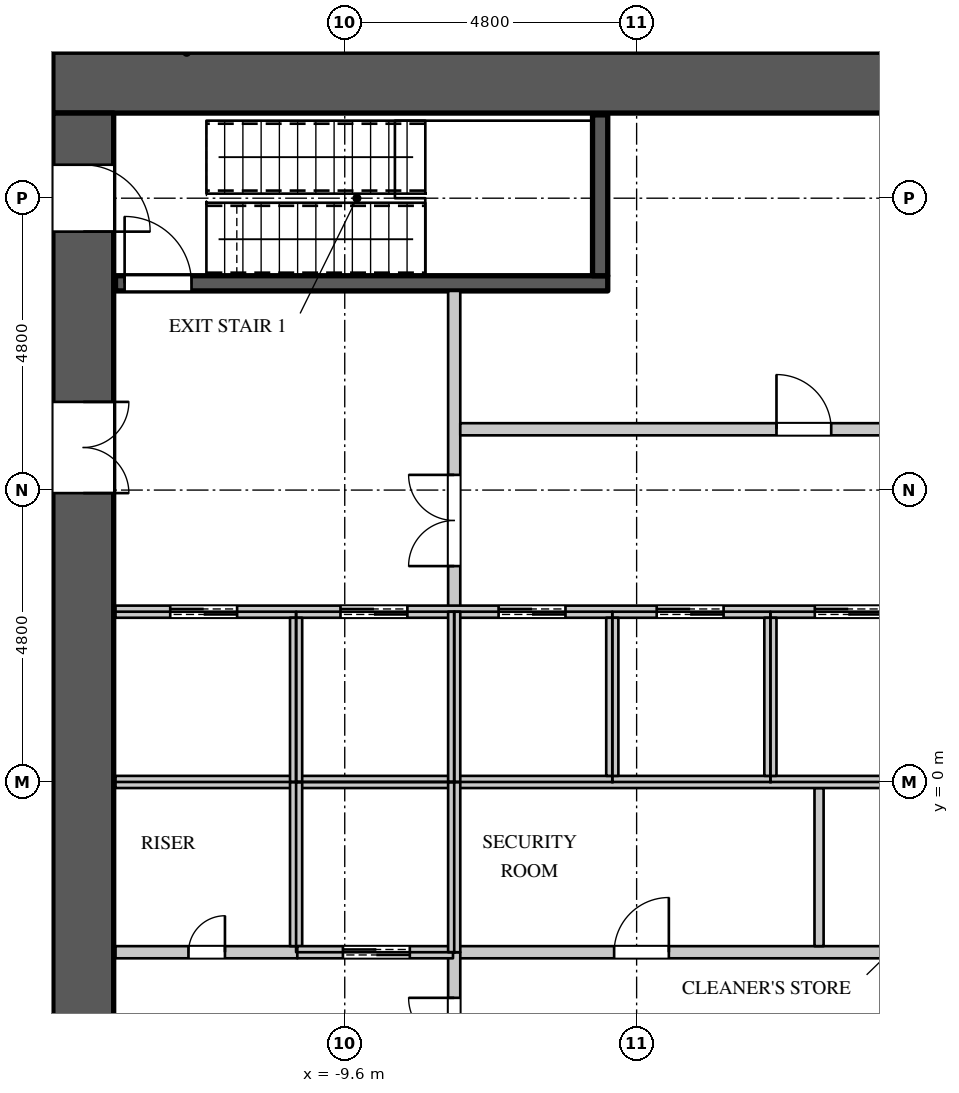
"""IFC4 building model, lengths in metres.
Left out: names, types, materials, properties, quantities, classifications, styles, units other than length and angle.
Written with IfcOpenShell. Run it as: python <this file> out.ifc"""

import sys

from ifc_helpers import new_model, si_unit, direction, frame, frame_2d, origin, place, context, subcontext, project, spatial, rectangle, extrude, element, fill, save


model = new_model("IFC4")
c1 = context("Model", 3, precision=1e-05, world=origin(), true_north=direction((0.0, 1.0)))
c2 = subcontext(c1, "Body", "Model", "MODEL_VIEW")
j1 = project(units=[si_unit("LENGTHUNIT", "METRE"), si_unit("PLANEANGLEUNIT", "RADIAN")], contexts=[c1])
p1 = place(None, origin())
s1 = spatial("IfcSite", under=j1, at=p1, CompositionType="ELEMENT")
p2 = place(p1, origin())
s2 = spatial("IfcBuilding", under=s1, at=p2, CompositionType="ELEMENT")
p3 = place(p2, frame((0.0, 0.0, 50.7)))
s3 = spatial("IfcBuildingStorey", under=s2, at=p3, CompositionType="ELEMENT", Elevation=50.7)
p4 = place(p3, frame((-14.4, 11.5, 0.0), z_axis=(0.0, 0.0, 1.0), x_axis=(1.0, 0.0, 0.0)))
e1 = element("IfcWall", 1, at=p4, inside=s3, PredefinedType="SHEAR", context=c2, shape_type="SweptSolid", body=[
    extrude(rectangle(XDim=28.8, YDim=1.0, at=frame_2d((14.4, 0.0))), origin(), (0.0, 0.0, 1.0), 4.2),
])
p5 = place(p3, frame((-13.9, -11.0, 0.0), z_axis=(0.0, 0.0, 1.0), x_axis=(0.0, 1.0, 0.0)))
e2 = element("IfcWall", 2, at=p5, inside=s3, PredefinedType="SHEAR", context=c2, shape_type="SweptSolid", body=[
    extrude(rectangle(XDim=22.0, YDim=1.0, at=frame_2d((11.0, 0.0))), origin(), (0.0, 0.0, 1.0), 4.2),
])
p6 = place(p5, frame((20.05, 0.0, 0.0)))
e3 = element("IfcOpeningElement", 3, at=p6, cuts=e2, PredefinedType="OPENING", context=c2, shape_type="SweptSolid", body=[
    extrude(rectangle(XDim=1.1, YDim=2.2, at=frame_2d((0.55, 1.1))), frame((0.0, 0.51, 0.0), z_axis=(0.0, -1.0, 0.0), x_axis=(1.0, 0.0, 0.0)), (0.0, 0.0, 1.0), 1.02),
])
p7 = place(p5, frame((0.85, 0.0, 0.0)))
e4 = element("IfcOpeningElement", 4, at=p7, cuts=e2, PredefinedType="OPENING", context=c2, shape_type="SweptSolid", body=[
    extrude(rectangle(XDim=1.1, YDim=2.2, at=frame_2d((0.55, 1.1))), frame((0.0, 0.51, 0.0), z_axis=(0.0, -1.0, 0.0), x_axis=(1.0, 0.0, 0.0)), (0.0, 0.0, 1.0), 1.02),
])
p8 = place(p5, frame((15.75, 0.0, 0.0)))
e5 = element("IfcOpeningElement", 5, at=p8, cuts=e2, PredefinedType="OPENING", context=c2, shape_type="SweptSolid", body=[
    extrude(rectangle(XDim=1.5, YDim=2.4, at=frame_2d((0.75, 1.2))), frame((0.0, 0.51, 0.0), z_axis=(0.0, -1.0, 0.0), x_axis=(1.0, 0.0, 0.0)), (0.0, 0.0, 1.0), 1.02),
])
p9 = place(p5, frame((4.75, 0.0, 0.0)))
e6 = element("IfcOpeningElement", 6, at=p9, cuts=e2, PredefinedType="OPENING", context=c2, shape_type="SweptSolid", body=[
    extrude(rectangle(XDim=1.5, YDim=2.4, at=frame_2d((0.75, 1.2))), frame((0.0, 0.51, 0.0), z_axis=(0.0, -1.0, 0.0), x_axis=(1.0, 0.0, 0.0)), (0.0, 0.0, 1.0), 1.02),
])
p10 = place(p3, frame((-7.82, -2.8, 0.0), z_axis=(0.0, 0.0, 1.0), x_axis=(1.0, 0.0, 0.0)))
e7 = element("IfcWall", 7, at=p10, inside=s3, PredefinedType="PARTITIONING", context=c2, shape_type="SweptSolid", body=[
    extrude(rectangle(XDim=15.64, YDim=0.2, at=frame_2d((7.82, 0.0))), origin(), (0.0, 0.0, 1.0), 3.95),
])
p11 = place(p10, frame((2.65, 0.0, 0.0)))
e8 = element("IfcOpeningElement", 8, at=p11, cuts=e7, PredefinedType="OPENING", context=c2, shape_type="SweptSolid", body=[
    extrude(rectangle(XDim=0.9, YDim=2.2, at=frame_2d((0.45, 1.1))), frame((0.0, 0.11, 0.0), z_axis=(0.0, -1.0, 0.0), x_axis=(1.0, 0.0, 0.0)), (0.0, 0.0, 1.0), 0.22),
])
p12 = place(p10, frame((8.15, 0.0, 0.0)))
e9 = element("IfcOpeningElement", 9, at=p12, cuts=e7, PredefinedType="OPENING", context=c2, shape_type="SweptSolid", body=[
    extrude(rectangle(XDim=0.9, YDim=2.2, at=frame_2d((0.45, 1.1))), frame((0.0, 0.11, 0.0), z_axis=(0.0, -1.0, 0.0), x_axis=(1.0, 0.0, 0.0)), (0.0, 0.0, 1.0), 0.22),
])
p13 = place(p10, frame((12.9, 0.0, 0.0)))
e10 = element("IfcOpeningElement", 10, at=p13, cuts=e7, PredefinedType="OPENING", context=c2, shape_type="SweptSolid", body=[
    extrude(rectangle(XDim=0.9, YDim=2.2, at=frame_2d((0.45, 1.1))), frame((0.0, 0.11, 0.0), z_axis=(0.0, -1.0, 0.0), x_axis=(1.0, 0.0, 0.0)), (0.0, 0.0, 1.0), 0.22),
])
p14 = place(p3, frame((-7.8, -5.8, 0.0), z_axis=(0.0, 0.0, 1.0), x_axis=(0.0, 1.0, 0.0)))
e11 = element("IfcWall", 11, at=p14, inside=s3, PredefinedType="PARTITIONING", context=c2, shape_type="SweptSolid", body=[
    extrude(rectangle(XDim=3.0, YDim=0.2, at=frame_2d((1.5, 0.0))), origin(), (0.0, 0.0, 1.0), 3.95),
])
p15 = place(p14, frame((0.75, 0.0, 0.0)))
e12 = element("IfcOpeningElement", 12, at=p15, cuts=e11, PredefinedType="OPENING", context=c2, shape_type="SweptSolid", body=[
    extrude(rectangle(XDim=1.5, YDim=2.4, at=frame_2d((0.75, 1.2))), frame((0.0, 0.11, 0.0), z_axis=(0.0, -1.0, 0.0), x_axis=(1.0, 0.0, 0.0)), (0.0, 0.0, 1.0), 0.22),
])
p16 = place(p3, frame((-7.8, 2.8, 0.0), z_axis=(0.0, 0.0, 1.0), x_axis=(0.0, 1.0, 0.0)))
e13 = element("IfcWall", 13, at=p16, inside=s3, PredefinedType="PARTITIONING", context=c2, shape_type="SweptSolid", body=[
    extrude(rectangle(XDim=5.275, YDim=0.2, at=frame_2d((2.637, 0.0))), origin(), (0.0, 0.0, 1.0), 3.95),
])
p17 = place(p16, frame((0.75, 0.0, 0.0)))
e14 = element("IfcOpeningElement", 14, at=p17, cuts=e13, PredefinedType="OPENING", context=c2, shape_type="SweptSolid", body=[
    extrude(rectangle(XDim=1.5, YDim=2.4, at=frame_2d((0.75, 1.2))), frame((0.0, 0.11, 0.0), z_axis=(0.0, -1.0, 0.0), x_axis=(1.0, 0.0, 0.0)), (0.0, 0.0, 1.0), 0.22),
])
p18 = place(p3, frame((-7.7, 5.8, 0.0), z_axis=(0.0, 0.0, 1.0), x_axis=(1.0, 0.0, 0.0)))
e15 = element("IfcWall", 15, at=p18, inside=s3, PredefinedType="PARTITIONING", context=c2, shape_type="SweptSolid", body=[
    extrude(rectangle(XDim=11.32, YDim=0.2, at=frame_2d((5.66, 0.0))), origin(), (0.0, 0.0, 1.0), 3.95),
])
p19 = place(p18, frame((5.2, 0.0, 0.0)))
e16 = element("IfcOpeningElement", 16, at=p19, cuts=e15, PredefinedType="OPENING", context=c2, shape_type="SweptSolid", body=[
    extrude(rectangle(XDim=0.9, YDim=2.2, at=frame_2d((0.45, 1.1))), frame((0.0, 0.11, 0.0), z_axis=(0.0, -1.0, 0.0), x_axis=(1.0, 0.0, 0.0)), (0.0, 0.0, 1.0), 0.22),
])
p20 = place(p3, frame((-1.8, -2.7, 0.0), z_axis=(0.0, 0.0, 1.0), x_axis=(0.0, 1.0, 0.0)))
e17 = element("IfcWall", 17, at=p20, inside=s3, PredefinedType="PARTITIONING", context=c2, shape_type="SweptSolid", body=[
    extrude(rectangle(XDim=2.6, YDim=0.15, at=frame_2d((1.3, 0.0))), origin(), (0.0, 0.0, 1.0), 3.95),
])
p21 = place(p3, frame((-13.37, -2.8, 0.0), z_axis=(0.0, 0.0, 1.0), x_axis=(1.0, 0.0, 0.0)))
e18 = element("IfcWall", 18, at=p21, inside=s3, PredefinedType="PARTITIONING", context=c2, shape_type="SweptSolid", body=[
    extrude(rectangle(XDim=2.99, YDim=0.2, at=frame_2d((1.495, 0.0))), origin(), (0.0, 0.0, 1.0), 3.95),
])
p22 = place(p21, frame((1.2, 0.0, 0.0)))
e19 = element("IfcOpeningElement", 19, at=p22, cuts=e18, PredefinedType="OPENING", context=c2, shape_type="SweptSolid", body=[
    extrude(rectangle(XDim=0.6, YDim=2.0, at=frame_2d((0.3, 1.0))), frame((0.0, 0.11, 0.0), z_axis=(0.0, -1.0, 0.0), x_axis=(1.0, 0.0, 0.0)), (0.0, 0.0, 1.0), 0.22),
])
p23 = place(p3, frame((-13.37, 0.0, 0.0), z_axis=(0.0, 0.0, 1.0), x_axis=(1.0, 0.0, 0.0)))
e20 = element("IfcWall", 20, at=p23, inside=s3, PredefinedType="PARTITIONING", context=c2, shape_type="SweptSolid", body=[
    extrude(rectangle(XDim=23.77, YDim=0.2, at=frame_2d((11.885, 0.0))), origin(), (0.0, 0.0, 1.0), 3.95),
])
p24 = place(p3, frame((-13.37, 2.8, 0.0), z_axis=(0.0, 0.0, 1.0), x_axis=(1.0, 0.0, 0.0)))
e21 = element("IfcWall", 21, at=p24, inside=s3, PredefinedType="PARTITIONING", context=c2, shape_type="SweptSolid", body=[
    extrude(rectangle(XDim=23.77, YDim=0.2, at=frame_2d((11.885, 0.0))), origin(), (0.0, 0.0, 1.0), 3.95),
])
p25 = place(p24, frame((0.9, 0.0, 0.0)))
e22 = element("IfcOpeningElement", 22, at=p25, cuts=e21, PredefinedType="OPENING", context=c2, shape_type="SweptSolid", body=[
    extrude(rectangle(XDim=1.1, YDim=2.2, at=frame_2d((0.55, 1.1))), frame((0.0, 0.11, 0.0), z_axis=(0.0, -1.0, 0.0), x_axis=(1.0, 0.0, 0.0)), (0.0, 0.0, 1.0), 0.22),
])
p26 = place(p24, frame((3.7, 0.0, 0.0)))
e23 = element("IfcOpeningElement", 23, at=p26, cuts=e21, PredefinedType="OPENING", context=c2, shape_type="SweptSolid", body=[
    extrude(rectangle(XDim=1.1, YDim=2.2, at=frame_2d((0.55, 1.1))), frame((0.0, 0.11, 0.0), z_axis=(0.0, -1.0, 0.0), x_axis=(1.0, 0.0, 0.0)), (0.0, 0.0, 1.0), 0.22),
])
p27 = place(p24, frame((6.3, 0.0, 0.0)))
e24 = element("IfcOpeningElement", 24, at=p27, cuts=e21, PredefinedType="OPENING", context=c2, shape_type="SweptSolid", body=[
    extrude(rectangle(XDim=1.1, YDim=2.2, at=frame_2d((0.55, 1.1))), frame((0.0, 0.11, 0.0), z_axis=(0.0, -1.0, 0.0), x_axis=(1.0, 0.0, 0.0)), (0.0, 0.0, 1.0), 0.22),
])
p28 = place(p24, frame((8.9, 0.0, 0.0)))
e25 = element("IfcOpeningElement", 25, at=p28, cuts=e21, PredefinedType="OPENING", context=c2, shape_type="SweptSolid", body=[
    extrude(rectangle(XDim=1.1, YDim=2.2, at=frame_2d((0.55, 1.1))), frame((0.0, 0.11, 0.0), z_axis=(0.0, -1.0, 0.0), x_axis=(1.0, 0.0, 0.0)), (0.0, 0.0, 1.0), 0.22),
])
p29 = place(p24, frame((11.5, 0.0, 0.0)))
e26 = element("IfcOpeningElement", 26, at=p29, cuts=e21, PredefinedType="OPENING", context=c2, shape_type="SweptSolid", body=[
    extrude(rectangle(XDim=1.1, YDim=2.2, at=frame_2d((0.55, 1.1))), frame((0.0, 0.11, 0.0), z_axis=(0.0, -1.0, 0.0), x_axis=(1.0, 0.0, 0.0)), (0.0, 0.0, 1.0), 0.22),
])
p30 = place(p24, frame((14.1, 0.0, 0.0)))
e27 = element("IfcOpeningElement", 27, at=p30, cuts=e21, PredefinedType="OPENING", context=c2, shape_type="SweptSolid", body=[
    extrude(rectangle(XDim=1.1, YDim=2.2, at=frame_2d((0.55, 1.1))), frame((0.0, 0.11, 0.0), z_axis=(0.0, -1.0, 0.0), x_axis=(1.0, 0.0, 0.0)), (0.0, 0.0, 1.0), 0.22),
])
p31 = place(p24, frame((16.7, 0.0, 0.0)))
e28 = element("IfcOpeningElement", 28, at=p31, cuts=e21, PredefinedType="OPENING", context=c2, shape_type="SweptSolid", body=[
    extrude(rectangle(XDim=1.1, YDim=2.2, at=frame_2d((0.55, 1.1))), frame((0.0, 0.11, 0.0), z_axis=(0.0, -1.0, 0.0), x_axis=(1.0, 0.0, 0.0)), (0.0, 0.0, 1.0), 0.22),
])
p32 = place(p24, frame((19.3, 0.0, 0.0)))
e29 = element("IfcOpeningElement", 29, at=p32, cuts=e21, PredefinedType="OPENING", context=c2, shape_type="SweptSolid", body=[
    extrude(rectangle(XDim=1.1, YDim=2.2, at=frame_2d((0.55, 1.1))), frame((0.0, 0.11, 0.0), z_axis=(0.0, -1.0, 0.0), x_axis=(1.0, 0.0, 0.0)), (0.0, 0.0, 1.0), 0.22),
])
p33 = place(p3, frame((-10.4, -2.7, 0.0), z_axis=(0.0, 0.0, 1.0), x_axis=(0.0, 1.0, 0.0)))
e30 = element("IfcWall", 30, at=p33, inside=s3, PredefinedType="PARTITIONING", context=c2, shape_type="SweptSolid", body=[
    extrude(rectangle(XDim=2.7, YDim=0.2, at=frame_2d((1.35, 0.0))), origin(), (0.0, 0.0, 1.0), 3.95),
])
p34 = place(p3, frame((-10.38, -2.8, 0.0), z_axis=(0.0, 0.0, 1.0), x_axis=(1.0, 0.0, 0.0)))
e31 = element("IfcWall", 31, at=p34, inside=s3, PredefinedType="PARTITIONING", context=c2, shape_type="SweptSolid", body=[
    extrude(rectangle(XDim=2.56, YDim=0.2, at=frame_2d((1.28, 0.0))), origin(), (0.0, 0.0, 1.0), 3.95),
])
p35 = place(p34, frame((0.75, 0.0, 0.0)))
e32 = element("IfcOpeningElement", 32, at=p35, cuts=e31, PredefinedType="OPENING", context=c2, shape_type="SweptSolid", body=[
    extrude(rectangle(XDim=1.1, YDim=2.2, at=frame_2d((0.55, 1.1))), frame((0.0, 0.11, 0.0), z_axis=(0.0, -1.0, 0.0), x_axis=(1.0, 0.0, 0.0)), (0.0, 0.0, 1.0), 0.22),
])
p36 = place(p3, frame((-10.4, 0.0, 0.0), z_axis=(0.0, 0.0, 1.0), x_axis=(0.0, 1.0, 0.0)))
e33 = element("IfcWall", 33, at=p36, inside=s3, PredefinedType="PARTITIONING", context=c2, shape_type="SweptSolid", body=[
    extrude(rectangle(XDim=2.7, YDim=0.2, at=frame_2d((1.35, 0.0))), origin(), (0.0, 0.0, 1.0), 3.95),
])
for number, where, z_axis, x_axis in (
    (34, (-7.8, -2.8, 0.0), (0.0, 0.0, 1.0), (0.0, 1.0, 0.0)),
    (35, (-7.8, 0.0, 0.0), (0.0, 0.0, 1.0), (0.0, 1.0, 0.0)),
):
    element("IfcWall", number, at=place(p3, frame(where, z_axis=z_axis, x_axis=x_axis)), inside=s3, PredefinedType="PARTITIONING", context=c2, shape_type="SweptSolid", body=[
        extrude(rectangle(XDim=2.8, YDim=0.2, at=frame_2d((1.4, 0.0))), origin(), (0.0, 0.0, 1.0), 3.95),
    ])
for number, where, z_axis, x_axis in (
    (36, (-5.2, 0.1, 0.0), (0.0, 0.0, 1.0), (0.0, 1.0, 0.0)),
    (37, (-2.6, 0.1, 0.0), (0.0, 0.0, 1.0), (0.0, 1.0, 0.0)),
):
    element("IfcWall", number, at=place(p3, frame(where, z_axis=z_axis, x_axis=x_axis)), inside=s3, PredefinedType="PARTITIONING", context=c2, shape_type="SweptSolid", body=[
        extrude(rectangle(XDim=2.6, YDim=0.2, at=frame_2d((1.3, 0.0))), origin(), (0.0, 0.0, 1.0), 3.95),
    ])
p37 = place(p3, frame((-13.37, 8.2, 0.0), z_axis=(0.0, 0.0, 1.0), x_axis=(1.0, 0.0, 0.0)))
e38 = element("IfcWall", 38, at=p37, inside=s3, PredefinedType="SHEAR", context=c2, shape_type="SweptSolid", body=[
    extrude(rectangle(XDim=8.095, YDim=0.25, at=frame_2d((4.048, 0.0))), origin(), (0.0, 0.0, 1.0), 3.95),
])
p38 = place(p37, frame((0.15, 0.0, 0.0)))
e39 = element("IfcOpeningElement", 39, at=p38, cuts=e38, PredefinedType="OPENING", context=c2, shape_type="SweptSolid", body=[
    extrude(rectangle(XDim=1.1, YDim=2.2, at=frame_2d((0.55, 1.1))), frame((0.0, 0.135, 0.0), z_axis=(0.0, -1.0, 0.0), x_axis=(1.0, 0.0, 0.0)), (0.0, 0.0, 1.0), 0.27),
])
p39 = place(p3, frame((-5.4, 8.325, 0.0), z_axis=(0.0, 0.0, 1.0), x_axis=(0.0, 1.0, 0.0)))
e40 = element("IfcWall", 40, at=p39, inside=s3, PredefinedType="SHEAR", context=c2, shape_type="SweptSolid", body=[
    extrude(rectangle(XDim=2.645, YDim=0.25, at=frame_2d((1.323, 0.0))), origin(), (0.0, 0.0, 1.0), 3.95),
])
p40 = place(p22, origin())
e41 = element("IfcDoor", 41, at=p40, inside=s3, OperationType="SINGLE_SWING_RIGHT", PredefinedType="DOOR", context=c2, shape_type="SweptSolid", body=[
    extrude(rectangle(XDim=0.6, YDim=2.0, at=frame_2d((0.3, 1.0))), frame((0.0, 0.025, 0.0), z_axis=(0.0, -1.0, 0.0), x_axis=(1.0, 0.0, 0.0)), (0.0, 0.0, 1.0), 0.05),
])
fill(e19, e41)
p41 = place(p19, origin())
e42 = element("IfcDoor", 42, at=p41, inside=s3, OperationType="SINGLE_SWING_LEFT", PredefinedType="DOOR", context=c2, shape_type="SweptSolid", body=[
    extrude(rectangle(XDim=0.9, YDim=2.2, at=frame_2d((0.45, 1.1))), frame((0.0, 0.025, 0.0), z_axis=(0.0, -1.0, 0.0), x_axis=(1.0, 0.0, 0.0)), (0.0, 0.0, 1.0), 0.05),
])
fill(e16, e42)
p42 = place(p11, origin())
e43 = element("IfcDoor", 43, at=p42, inside=s3, OperationType="SINGLE_SWING_RIGHT", PredefinedType="DOOR", context=c2, shape_type="SweptSolid", body=[
    extrude(rectangle(XDim=0.9, YDim=2.2, at=frame_2d((0.45, 1.1))), frame((0.0, 0.025, 0.0), z_axis=(0.0, -1.0, 0.0), x_axis=(1.0, 0.0, 0.0)), (0.0, 0.0, 1.0), 0.05),
])
fill(e8, e43)
p43 = place(p25, origin())
e44 = element("IfcDoor", 44, at=p43, inside=s3, OperationType="DOUBLE_DOOR_SLIDING", PredefinedType="DOOR", context=c2, shape_type="SweptSolid", body=[
    extrude(rectangle(XDim=1.1, YDim=2.2, at=frame_2d((0.55, 1.1))), frame((0.0, 0.025, 0.0), z_axis=(0.0, -1.0, 0.0), x_axis=(1.0, 0.0, 0.0)), (0.0, 0.0, 1.0), 0.05),
])
fill(e22, e44)
p44 = place(p26, origin())
e45 = element("IfcDoor", 45, at=p44, inside=s3, OperationType="DOUBLE_DOOR_SLIDING", PredefinedType="DOOR", context=c2, shape_type="SweptSolid", body=[
    extrude(rectangle(XDim=1.1, YDim=2.2, at=frame_2d((0.55, 1.1))), frame((0.0, 0.025, 0.0), z_axis=(0.0, -1.0, 0.0), x_axis=(1.0, 0.0, 0.0)), (0.0, 0.0, 1.0), 0.05),
])
fill(e23, e45)
p45 = place(p35, origin())
e46 = element("IfcDoor", 46, at=p45, inside=s3, OperationType="DOUBLE_DOOR_SLIDING", PredefinedType="DOOR", context=c2, shape_type="SweptSolid", body=[
    extrude(rectangle(XDim=1.1, YDim=2.2, at=frame_2d((0.55, 1.1))), frame((0.0, 0.025, 0.0), z_axis=(0.0, -1.0, 0.0), x_axis=(1.0, 0.0, 0.0)), (0.0, 0.0, 1.0), 0.05),
])
fill(e32, e46)
p46 = place(p27, origin())
e47 = element("IfcDoor", 47, at=p46, inside=s3, OperationType="DOUBLE_DOOR_SLIDING", PredefinedType="DOOR", context=c2, shape_type="SweptSolid", body=[
    extrude(rectangle(XDim=1.1, YDim=2.2, at=frame_2d((0.55, 1.1))), frame((0.0, 0.025, 0.0), z_axis=(0.0, -1.0, 0.0), x_axis=(1.0, 0.0, 0.0)), (0.0, 0.0, 1.0), 0.05),
])
fill(e24, e47)
p47 = place(p28, origin())
e48 = element("IfcDoor", 48, at=p47, inside=s3, OperationType="DOUBLE_DOOR_SLIDING", PredefinedType="DOOR", context=c2, shape_type="SweptSolid", body=[
    extrude(rectangle(XDim=1.1, YDim=2.2, at=frame_2d((0.55, 1.1))), frame((0.0, 0.025, 0.0), z_axis=(0.0, -1.0, 0.0), x_axis=(1.0, 0.0, 0.0)), (0.0, 0.0, 1.0), 0.05),
])
fill(e25, e48)
p48 = place(p29, origin())
e49 = element("IfcDoor", 49, at=p48, inside=s3, OperationType="DOUBLE_DOOR_SLIDING", PredefinedType="DOOR", context=c2, shape_type="SweptSolid", body=[
    extrude(rectangle(XDim=1.1, YDim=2.2, at=frame_2d((0.55, 1.1))), frame((0.0, 0.025, 0.0), z_axis=(0.0, -1.0, 0.0), x_axis=(1.0, 0.0, 0.0)), (0.0, 0.0, 1.0), 0.05),
])
fill(e26, e49)
p49 = place(p38, origin())
e50 = element("IfcDoor", 50, at=p49, inside=s3, OperationType="SINGLE_SWING_LEFT", PredefinedType="DOOR", context=c2, shape_type="SweptSolid", body=[
    extrude(rectangle(XDim=1.1, YDim=2.2, at=frame_2d((0.55, 1.1))), frame((0.0, 0.025, 0.0), z_axis=(0.0, -1.0, 0.0), x_axis=(1.0, 0.0, 0.0)), (0.0, 0.0, 1.0), 0.05),
])
fill(e39, e50)
p50 = place(p17, origin())
e51 = element("IfcDoor", 51, at=p50, inside=s3, OperationType="DOUBLE_DOOR_SINGLE_SWING", PredefinedType="DOOR", context=c2, shape_type="SweptSolid", body=[
    extrude(rectangle(XDim=1.5, YDim=2.4, at=frame_2d((0.75, 1.2))), frame((0.0, 0.025, 0.0), z_axis=(0.0, -1.0, 0.0), x_axis=(1.0, 0.0, 0.0)), (0.0, 0.0, 1.0), 0.05),
])
fill(e14, e51)
p51 = place(p15, origin())
e52 = element("IfcDoor", 52, at=p51, inside=s3, OperationType="DOUBLE_DOOR_SINGLE_SWING", PredefinedType="DOOR", context=c2, shape_type="SweptSolid", body=[
    extrude(rectangle(XDim=1.5, YDim=2.4, at=frame_2d((0.75, 1.2))), frame((0.0, 0.025, 0.0), z_axis=(0.0, -1.0, 0.0), x_axis=(1.0, 0.0, 0.0)), (0.0, 0.0, 1.0), 0.05),
])
fill(e12, e52)
p52 = place(p6, origin())
e53 = element("IfcDoor", 53, at=p52, inside=s3, OperationType="SINGLE_SWING_RIGHT", PredefinedType="DOOR", context=c2, shape_type="SweptSolid", body=[
    extrude(rectangle(XDim=1.1, YDim=2.2, at=frame_2d((0.55, 1.1))), frame((0.0, -0.445, 0.0), z_axis=(0.0, -1.0, 0.0), x_axis=(1.0, 0.0, 0.0)), (0.0, 0.0, 1.0), 0.05),
])
fill(e3, e53)
p53 = place(p8, origin())
e54 = element("IfcDoor", 54, at=p53, inside=s3, OperationType="DOUBLE_DOOR_SINGLE_SWING", PredefinedType="DOOR", context=c2, shape_type="SweptSolid", body=[
    extrude(rectangle(XDim=1.5, YDim=2.4, at=frame_2d((0.75, 1.2))), frame((0.0, -0.445, 0.0), z_axis=(0.0, -1.0, 0.0), x_axis=(1.0, 0.0, 0.0)), (0.0, 0.0, 1.0), 0.05),
])
fill(e5, e54)
save(model, sys.argv[1])
